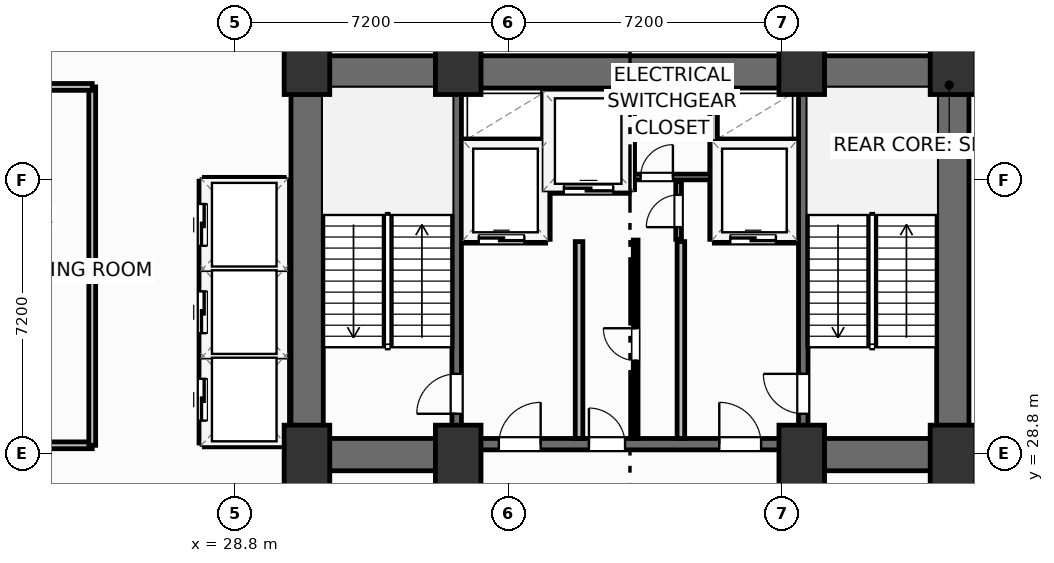
"""IFC4 building model, lengths in metres.
Left out: names, types, materials, properties, quantities, classifications, styles, units other than length and angle.
Written with IfcOpenShell. Run it as: python <this file> out.ifc"""

import sys

from ifc_helpers import new_model, si_unit, direction, frame, frame_2d, origin, origin_2d, place, context, subcontext, project, spatial, rectangle, extrude, element, fill, save


model = new_model("IFC4")
c1 = context("Model", 3, precision=1e-05, world=origin(), true_north=direction((0.0, 1.0)))
c2 = subcontext(c1, "Body", "Model", "MODEL_VIEW")
j1 = project(units=[si_unit("LENGTHUNIT", "METRE"), si_unit("PLANEANGLEUNIT", "RADIAN")], contexts=[c1])
p1 = place(None, origin())
s1 = spatial("IfcSite", under=j1, at=p1, CompositionType="ELEMENT")
p2 = place(p1, origin())
s2 = spatial("IfcBuilding", under=s1, at=p2, CompositionType="ELEMENT")
p3 = place(p2, frame((0.0, 0.0, -4.5)))
s3 = spatial("IfcBuildingStorey", under=s2, at=p3, CompositionType="ELEMENT", Elevation=-4.5)
for number, where, z_axis, x_axis in (
    (1, (30.7, 28.75, 0.0), (0.0, 0.0, 1.0), (1.0, 0.0, 0.0)),
    (2, (34.68, 28.75, 0.0), (0.0, 0.0, 1.0), (1.0, 0.0, 0.0)),
    (3, (43.72, 28.75, 0.0), (0.0, 0.0, 1.0), (1.0, 0.0, 0.0)),
    (4, (47.7, 28.75, 0.0), (0.0, 0.0, 1.0), (1.0, 0.0, 0.0)),
    (5, (30.7, 39.05, 0.0), (0.0, 0.0, 1.0), (1.0, 0.0, 0.0)),
    (6, (34.68, 39.05, 0.0), (0.0, 0.0, 1.0), (1.0, 0.0, 0.0)),
    (7, (43.72, 39.05, 0.0), (0.0, 0.0, 1.0), (1.0, 0.0, 0.0)),
    (8, (47.7, 39.05, 0.0), (0.0, 0.0, 1.0), (1.0, 0.0, 0.0)),
):
    element("IfcColumn", number, at=place(p3, frame(where, z_axis=z_axis, x_axis=x_axis)), inside=s3, PredefinedType="COLUMN", context=c2, shape_type="SweptSolid", body=[
        extrude(rectangle(XDim=1.2, YDim=1.6, at=origin_2d()), origin(), (0.0, 0.0, 1.0), 4.5),
    ])
p4 = place(p3, frame((30.28, 38.845, 0.0), z_axis=(0.0, 0.0, 1.0), x_axis=(1.0, 0.0, 0.0)))
e9 = element("IfcWall", 9, at=p4, inside=s3, PredefinedType="SHEAR", context=c2, shape_type="SweptSolid", body=[
    extrude(rectangle(XDim=17.84, YDim=0.85, at=frame_2d((8.92, 0.0))), origin(), (0.0, 0.0, 1.0), 4.18),
])
for number, where, z_axis, x_axis in (
    (10, (30.705, 29.2, 0.0), (0.0, 0.0, 1.0), (0.0, 1.0, 0.0)),
    (11, (47.695, 29.2, 0.0), (0.0, 0.0, 1.0), (0.0, 1.0, 0.0)),
):
    element("IfcWall", number, at=place(p3, frame(where, z_axis=z_axis, x_axis=x_axis)), inside=s3, PredefinedType="SHEAR", context=c2, shape_type="SweptSolid", body=[
        extrude(rectangle(XDim=9.22, YDim=0.85, at=frame_2d((4.61, 0.0))), origin(), (0.0, 0.0, 1.0), 4.18),
    ])
for number, where, z_axis, x_axis in (
    (12, (30.28, 28.775, 0.0), (0.0, 0.0, 1.0), (1.0, 0.0, 0.0)),
    (13, (43.6, 28.775, 0.0), (0.0, 0.0, 1.0), (1.0, 0.0, 0.0)),
):
    element("IfcWall", number, at=place(p3, frame(where, z_axis=z_axis, x_axis=x_axis)), inside=s3, PredefinedType="SHEAR", context=c2, shape_type="SweptSolid", body=[
        extrude(rectangle(XDim=4.52, YDim=0.85, at=frame_2d((2.26, 0.0))), origin(), (0.0, 0.0, 1.0), 4.18),
    ])
p5 = place(p3, frame((34.8, 29.05, 0.0), z_axis=(0.0, 0.0, 1.0), x_axis=(1.0, 0.0, 0.0)))
e14 = element("IfcWall", 14, at=p5, inside=s3, PredefinedType="SHEAR", context=c2, shape_type="SweptSolid", body=[
    extrude(rectangle(XDim=8.8, YDim=0.3, at=frame_2d((4.4, 0.0))), origin(), (0.0, 0.0, 1.0), 4.18),
])
p6 = place(p5, frame((0.95, 0.0, 0.0)))
e15 = element("IfcOpeningElement", 15, at=p6, cuts=e14, PredefinedType="OPENING", context=c2, shape_type="SweptSolid", body=[
    extrude(rectangle(XDim=1.1, YDim=2.15, at=frame_2d((0.55, 1.075))), frame((0.0, 0.16, 0.0), z_axis=(0.0, -1.0, 0.0), x_axis=(1.0, 0.0, 0.0)), (0.0, 0.0, 1.0), 0.32),
])
p7 = place(p5, frame((6.75, 0.0, 0.0)))
e16 = element("IfcOpeningElement", 16, at=p7, cuts=e14, PredefinedType="OPENING", context=c2, shape_type="SweptSolid", body=[
    extrude(rectangle(XDim=1.1, YDim=2.15, at=frame_2d((0.55, 1.075))), frame((0.0, 0.16, 0.0), z_axis=(0.0, -1.0, 0.0), x_axis=(1.0, 0.0, 0.0)), (0.0, 0.0, 1.0), 0.32),
])
p8 = place(p5, frame((3.32, 0.0, 0.0)))
e17 = element("IfcOpeningElement", 17, at=p8, cuts=e14, PredefinedType="OPENING", context=c2, shape_type="SweptSolid", body=[
    extrude(rectangle(XDim=0.95, YDim=2.15, at=frame_2d((0.475, 1.075))), frame((0.0, 0.16, 0.0), z_axis=(0.0, -1.0, 0.0), x_axis=(1.0, 0.0, 0.0)), (0.0, 0.0, 1.0), 0.32),
])
p9 = place(p3, frame((34.64, 29.2, 0.0), z_axis=(0.0, 0.0, 1.0), x_axis=(0.0, 1.0, 0.0)))
e18 = element("IfcWall", 18, at=p9, inside=s3, PredefinedType="SHEAR", context=c2, shape_type="SweptSolid", body=[
    extrude(rectangle(XDim=9.22, YDim=0.25, at=frame_2d((4.61, 0.0))), origin(), (0.0, 0.0, 1.0), 4.18),
])
p10 = place(p9, frame((0.65, 0.0, 0.0)))
e19 = element("IfcOpeningElement", 19, at=p10, cuts=e18, PredefinedType="OPENING", context=c2, shape_type="SweptSolid", body=[
    extrude(rectangle(XDim=1.05, YDim=2.15, at=frame_2d((0.525, 1.075))), frame((0.0, 0.135, 0.0), z_axis=(0.0, -1.0, 0.0), x_axis=(1.0, 0.0, 0.0)), (0.0, 0.0, 1.0), 0.27),
])
p11 = place(p3, frame((43.76, 29.2, 0.0), z_axis=(0.0, 0.0, 1.0), x_axis=(0.0, 1.0, 0.0)))
e20 = element("IfcWall", 20, at=p11, inside=s3, PredefinedType="SHEAR", context=c2, shape_type="SweptSolid", body=[
    extrude(rectangle(XDim=9.22, YDim=0.25, at=frame_2d((4.61, 0.0))), origin(), (0.0, 0.0, 1.0), 4.18),
])
p12 = place(p11, frame((0.65, 0.0, 0.0)))
e21 = element("IfcOpeningElement", 21, at=p12, cuts=e20, PredefinedType="OPENING", context=c2, shape_type="SweptSolid", body=[
    extrude(rectangle(XDim=1.05, YDim=2.15, at=frame_2d((0.525, 1.075))), frame((0.0, 0.135, 0.0), z_axis=(0.0, -1.0, 0.0), x_axis=(1.0, 0.0, 0.0)), (0.0, 0.0, 1.0), 0.27),
])
p13 = place(p3, frame((18.55, 29.02, 0.0), z_axis=(0.0, 0.0, 1.0), x_axis=(1.0, 0.0, 0.0)))
e22 = element("IfcWall", 22, at=p13, inside=s3, PredefinedType="PARTITIONING", context=c2, shape_type="SweptSolid", body=[
    extrude(rectangle(XDim=6.5, YDim=0.18, at=frame_2d((3.25, 0.0))), origin(), (0.0, 0.0, 1.0), 4.18),
])
p14 = place(p13, frame((2.2, 0.0, 0.0)))
e23 = element("IfcOpeningElement", 23, at=p14, cuts=e22, PredefinedType="OPENING", context=c2, shape_type="SweptSolid", body=[
    extrude(rectangle(XDim=1.6, YDim=2.05, at=frame_2d((0.8, 1.025))), frame((0.0, 0.1, 0.0), z_axis=(0.0, -1.0, 0.0), x_axis=(1.0, 0.0, 0.0)), (0.0, 0.0, 1.0), 0.2),
])
p15 = place(p3, frame((25.05, 29.02, 0.0), z_axis=(0.0, 0.0, 1.0), x_axis=(0.0, 1.0, 0.0)))
e24 = element("IfcWall", 24, at=p15, inside=s3, PredefinedType="PARTITIONING", context=c2, shape_type="SweptSolid", body=[
    extrude(rectangle(XDim=9.43, YDim=0.18, at=frame_2d((4.715, 0.0))), origin(), (0.0, 0.0, 1.0), 4.18),
])
p16 = place(p3, frame((18.55, 38.45, 0.0), z_axis=(0.0, 0.0, 1.0), x_axis=(1.0, 0.0, 0.0)))
e25 = element("IfcWall", 25, at=p16, inside=s3, PredefinedType="PARTITIONING", context=c2, shape_type="SweptSolid", body=[
    extrude(rectangle(XDim=6.5, YDim=0.18, at=frame_2d((3.25, 0.0))), origin(), (0.0, 0.0, 1.0), 4.18),
])
for number, where, z_axis, x_axis in (
    (26, (37.86, 29.2, 0.0), (0.0, 0.0, 1.0), (0.0, 1.0, 0.0)),
    (27, (40.54, 29.2, 0.0), (0.0, 0.0, 1.0), (0.0, 1.0, 0.0)),
):
    element("IfcWall", number, at=place(p3, frame(where, z_axis=z_axis, x_axis=x_axis)), inside=s3, PredefinedType="PARTITIONING", context=c2, shape_type="SweptSolid", body=[
        extrude(rectangle(XDim=5.18, YDim=0.2, at=frame_2d((2.59, 0.0))), origin(), (0.0, 0.0, 1.0), 4.18),
    ])
p17 = place(p3, frame((34.8, 34.44, 0.0), z_axis=(0.0, 0.0, 1.0), x_axis=(1.0, 0.0, 0.0)))
e28 = element("IfcWall", 28, at=p17, inside=s3, PredefinedType="PARTITIONING", context=c2, shape_type="SweptSolid", body=[
    extrude(rectangle(XDim=2.18, YDim=0.2, at=frame_2d((1.09, 0.0))), origin(), (0.0, 0.0, 1.0), 4.18),
])
p18 = place(p17, frame((0.42, 0.0, 0.0)))
e29 = element("IfcOpeningElement", 29, at=p18, cuts=e28, PredefinedType="OPENING", context=c2, shape_type="SweptSolid", body=[
    extrude(rectangle(XDim=1.2, YDim=2.2, at=frame_2d((0.6, 1.1))), frame((0.0, 0.11, 0.0), z_axis=(0.0, -1.0, 0.0), x_axis=(1.0, 0.0, 0.0)), (0.0, 0.0, 1.0), 0.22),
])
p19 = place(p3, frame((34.8, 36.98, 0.0), z_axis=(0.0, 0.0, 1.0), x_axis=(1.0, 0.0, 0.0)))
e30 = element("IfcWall", 30, at=p19, inside=s3, PredefinedType="PARTITIONING", context=c2, shape_type="SweptSolid", body=[
    extrude(rectangle(XDim=2.18, YDim=0.2, at=frame_2d((1.09, 0.0))), origin(), (0.0, 0.0, 1.0), 4.18),
])
p20 = place(p3, frame((37.0, 34.44, 0.0), z_axis=(0.0, 0.0, 1.0), x_axis=(0.0, 1.0, 0.0)))
e31 = element("IfcWall", 31, at=p20, inside=s3, PredefinedType="PARTITIONING", context=c2, shape_type="SweptSolid", body=[
    extrude(rectangle(XDim=3.9, YDim=0.2, at=frame_2d((1.95, 0.0))), origin(), (0.0, 0.0, 1.0), 4.18),
])
p21 = place(p3, frame((41.42, 34.44, 0.0), z_axis=(0.0, 0.0, 1.0), x_axis=(1.0, 0.0, 0.0)))
e32 = element("IfcWall", 32, at=p21, inside=s3, PredefinedType="PARTITIONING", context=c2, shape_type="SweptSolid", body=[
    extrude(rectangle(XDim=2.18, YDim=0.2, at=frame_2d((1.09, 0.0))), origin(), (0.0, 0.0, 1.0), 4.18),
])
p22 = place(p21, frame((0.42, 0.0, 0.0)))
e33 = element("IfcOpeningElement", 33, at=p22, cuts=e32, PredefinedType="OPENING", context=c2, shape_type="SweptSolid", body=[
    extrude(rectangle(XDim=1.2, YDim=2.2, at=frame_2d((0.6, 1.1))), frame((0.0, 0.11, 0.0), z_axis=(0.0, -1.0, 0.0), x_axis=(1.0, 0.0, 0.0)), (0.0, 0.0, 1.0), 0.22),
])
p23 = place(p3, frame((41.42, 36.98, 0.0), z_axis=(0.0, 0.0, 1.0), x_axis=(1.0, 0.0, 0.0)))
e34 = element("IfcWall", 34, at=p23, inside=s3, PredefinedType="PARTITIONING", context=c2, shape_type="SweptSolid", body=[
    extrude(rectangle(XDim=2.18, YDim=0.2, at=frame_2d((1.09, 0.0))), origin(), (0.0, 0.0, 1.0), 4.18),
])
p24 = place(p3, frame((41.4, 34.44, 0.0), z_axis=(0.0, 0.0, 1.0), x_axis=(0.0, 1.0, 0.0)))
e35 = element("IfcWall", 35, at=p24, inside=s3, PredefinedType="PARTITIONING", context=c2, shape_type="SweptSolid", body=[
    extrude(rectangle(XDim=3.9, YDim=0.2, at=frame_2d((1.95, 0.0))), origin(), (0.0, 0.0, 1.0), 4.18),
])
p25 = place(p3, frame((37.06, 35.75, 0.0), z_axis=(0.0, 0.0, 1.0), x_axis=(1.0, 0.0, 0.0)))
e36 = element("IfcWall", 36, at=p25, inside=s3, PredefinedType="PARTITIONING", context=c2, shape_type="SweptSolid", body=[
    extrude(rectangle(XDim=2.12, YDim=0.2, at=frame_2d((1.06, 0.0))), origin(), (0.0, 0.0, 1.0), 4.18),
])
p26 = place(p25, frame((0.4, 0.0, 0.0)))
e37 = element("IfcOpeningElement", 37, at=p26, cuts=e36, PredefinedType="OPENING", context=c2, shape_type="SweptSolid", body=[
    extrude(rectangle(XDim=1.3, YDim=2.2, at=frame_2d((0.65, 1.1))), frame((0.0, 0.11, 0.0), z_axis=(0.0, -1.0, 0.0), x_axis=(1.0, 0.0, 0.0)), (0.0, 0.0, 1.0), 0.22),
])
p27 = place(p3, frame((39.22, 35.75, 0.0), z_axis=(0.0, 0.0, 1.0), x_axis=(0.0, 1.0, 0.0)))
e38 = element("IfcWall", 38, at=p27, inside=s3, PredefinedType="PARTITIONING", context=c2, shape_type="SweptSolid", body=[
    extrude(rectangle(XDim=2.59, YDim=0.2, at=frame_2d((1.295, 0.0))), origin(), (0.0, 0.0, 1.0), 4.18),
])
p28 = place(p3, frame((39.3, 36.08, 0.0), z_axis=(0.0, 0.0, 1.0), x_axis=(1.0, 0.0, 0.0)))
e39 = element("IfcWall", 39, at=p28, inside=s3, PredefinedType="PARTITIONING", context=c2, shape_type="SweptSolid", body=[
    extrude(rectangle(XDim=2.02, YDim=0.15, at=frame_2d((1.01, 0.0))), origin(), (0.0, 0.0, 1.0), 4.18),
])
p29 = place(p28, frame((0.18, 0.0, 0.0)))
e40 = element("IfcOpeningElement", 40, at=p29, cuts=e39, PredefinedType="OPENING", context=c2, shape_type="SweptSolid", body=[
    extrude(rectangle(XDim=0.85, YDim=2.05, at=frame_2d((0.425, 1.025))), frame((0.0, 0.085, 0.0), z_axis=(0.0, -1.0, 0.0), x_axis=(1.0, 0.0, 0.0)), (0.0, 0.0, 1.0), 0.17),
])
p30 = place(p3, frame((40.48, 34.44, 0.0), z_axis=(0.0, 0.0, 1.0), x_axis=(0.0, 1.0, 0.0)))
e41 = element("IfcWall", 41, at=p30, inside=s3, PredefinedType="PARTITIONING", context=c2, shape_type="SweptSolid", body=[
    extrude(rectangle(XDim=1.52, YDim=0.15, at=frame_2d((0.76, 0.0))), origin(), (0.0, 0.0, 1.0), 4.18),
])
p31 = place(p30, frame((0.32, 0.0, 0.0)))
e42 = element("IfcOpeningElement", 42, at=p31, cuts=e41, PredefinedType="OPENING", context=c2, shape_type="SweptSolid", body=[
    extrude(rectangle(XDim=0.85, YDim=2.05, at=frame_2d((0.425, 1.025))), frame((0.0, 0.085, 0.0), z_axis=(0.0, -1.0, 0.0), x_axis=(1.0, 0.0, 0.0)), (0.0, 0.0, 1.0), 0.17),
])
p32 = place(p3, frame((39.35, 29.2, 0.0), z_axis=(0.0, 0.0, 1.0), x_axis=(0.0, 1.0, 0.0)))
e43 = element("IfcWall", 43, at=p32, inside=s3, PredefinedType="PARTITIONING", context=c2, shape_type="SweptSolid", body=[
    extrude(rectangle(XDim=5.22, YDim=0.125, at=frame_2d((2.61, 0.0))), origin(), (0.0, 0.0, 1.0), 4.18),
])
p33 = place(p32, frame((2.05, 0.0, 0.0)))
e44 = element("IfcOpeningElement", 44, at=p33, cuts=e43, PredefinedType="OPENING", context=c2, shape_type="SweptSolid", body=[
    extrude(rectangle(XDim=0.85, YDim=2.05, at=frame_2d((0.425, 1.025))), frame((0.0, 0.073, 0.0), z_axis=(0.0, -1.0, 0.0), x_axis=(1.0, 0.0, 0.0)), (0.0, 0.0, 1.0), 0.145),
])
for number, where, z_axis, x_axis in (
    (45, (28.02, 31.375, 0.0), (0.0, 0.0, 1.0), (1.0, 0.0, 0.0)),
    (46, (28.02, 33.675, 0.0), (0.0, 0.0, 1.0), (1.0, 0.0, 0.0)),
):
    element("IfcWall", number, at=place(p3, frame(where, z_axis=z_axis, x_axis=x_axis)), inside=s3, PredefinedType="PARTITIONING", context=c2, shape_type="SweptSolid", body=[
        extrude(rectangle(XDim=2.06, YDim=0.2, at=frame_2d((1.03, 0.0))), origin(), (0.0, 0.0, 1.0), 4.18),
    ])
for number, where, z_axis, x_axis in (
    (47, (28.0, 29.08, 0.0), (0.0, 0.0, 1.0), (1.0, 0.0, 0.0)),
    (48, (28.0, 35.97, 0.0), (0.0, 0.0, 1.0), (1.0, 0.0, 0.0)),
):
    element("IfcWall", number, at=place(p3, frame(where, z_axis=z_axis, x_axis=x_axis)), inside=s3, PredefinedType="PARTITIONING", context=c2, shape_type="SweptSolid", body=[
        extrude(rectangle(XDim=2.1, YDim=0.2, at=frame_2d((1.05, 0.0))), origin(), (0.0, 0.0, 1.0), 4.18),
    ])
p34 = place(p3, frame((30.12, 29.08, 0.0), z_axis=(0.0, 0.0, 1.0), x_axis=(0.0, 1.0, 0.0)))
e49 = element("IfcWall", 49, at=p34, inside=s3, PredefinedType="PARTITIONING", context=c2, shape_type="SweptSolid", body=[
    extrude(rectangle(XDim=6.89, YDim=0.2, at=frame_2d((3.445, 0.0))), origin(), (0.0, 0.0, 1.0), 4.18),
])
p35 = place(p3, frame((27.96, 29.08, 0.0), z_axis=(0.0, 0.0, 1.0), x_axis=(0.0, 1.0, 0.0)))
e50 = element("IfcWall", 50, at=p35, inside=s3, PredefinedType="PARTITIONING", context=c2, shape_type="SweptSolid", body=[
    extrude(rectangle(XDim=6.89, YDim=0.2, at=frame_2d((3.445, 0.0))), origin(), (0.0, 0.0, 1.0), 4.18),
])
p36 = place(p35, frame((0.59, 0.0, 0.0)))
e51 = element("IfcOpeningElement", 51, at=p36, cuts=e50, PredefinedType="OPENING", context=c2, shape_type="SweptSolid", body=[
    extrude(rectangle(XDim=1.1, YDim=2.15, at=frame_2d((0.55, 1.075))), frame((0.0, 0.11, 0.0), z_axis=(0.0, -1.0, 0.0), x_axis=(1.0, 0.0, 0.0)), (0.0, 0.0, 1.0), 0.22),
])
p37 = place(p35, frame((2.89, 0.0, 0.0)))
e52 = element("IfcOpeningElement", 52, at=p37, cuts=e50, PredefinedType="OPENING", context=c2, shape_type="SweptSolid", body=[
    extrude(rectangle(XDim=1.1, YDim=2.15, at=frame_2d((0.55, 1.075))), frame((0.0, 0.11, 0.0), z_axis=(0.0, -1.0, 0.0), x_axis=(1.0, 0.0, 0.0)), (0.0, 0.0, 1.0), 0.22),
])
p38 = place(p35, frame((5.19, 0.0, 0.0)))
e53 = element("IfcOpeningElement", 53, at=p38, cuts=e50, PredefinedType="OPENING", context=c2, shape_type="SweptSolid", body=[
    extrude(rectangle(XDim=1.1, YDim=2.15, at=frame_2d((0.55, 1.075))), frame((0.0, 0.11, 0.0), z_axis=(0.0, -1.0, 0.0), x_axis=(1.0, 0.0, 0.0)), (0.0, 0.0, 1.0), 0.22),
])
p39 = place(p10, origin())
e54 = element("IfcDoor", 54, at=p39, inside=s3, OperationType="SINGLE_SWING_LEFT", PredefinedType="DOOR", context=c2, shape_type="SweptSolid", body=[
    extrude(rectangle(XDim=1.05, YDim=2.15, at=frame_2d((0.525, 1.075))), frame((0.0, 0.025, 0.0), z_axis=(0.0, -1.0, 0.0), x_axis=(1.0, 0.0, 0.0)), (0.0, 0.0, 1.0), 0.05),
])
fill(e19, e54)
p40 = place(p12, origin())
e55 = element("IfcDoor", 55, at=p40, inside=s3, OperationType="SINGLE_SWING_RIGHT", PredefinedType="DOOR", context=c2, shape_type="SweptSolid", body=[
    extrude(rectangle(XDim=1.05, YDim=2.15, at=frame_2d((0.525, 1.075))), frame((0.0, 0.025, 0.0), z_axis=(0.0, -1.0, 0.0), x_axis=(1.0, 0.0, 0.0)), (0.0, 0.0, 1.0), 0.05),
])
fill(e21, e55)
p41 = place(p6, origin())
e56 = element("IfcDoor", 56, at=p41, inside=s3, OperationType="SINGLE_SWING_RIGHT", PredefinedType="DOOR", context=c2, shape_type="SweptSolid", body=[
    extrude(rectangle(XDim=1.1, YDim=2.15, at=frame_2d((0.55, 1.075))), frame((0.0, 0.025, 0.0), z_axis=(0.0, -1.0, 0.0), x_axis=(1.0, 0.0, 0.0)), (0.0, 0.0, 1.0), 0.05),
])
fill(e15, e56)
p42 = place(p7, origin())
e57 = element("IfcDoor", 57, at=p42, inside=s3, OperationType="SINGLE_SWING_LEFT", PredefinedType="DOOR", context=c2, shape_type="SweptSolid", body=[
    extrude(rectangle(XDim=1.1, YDim=2.15, at=frame_2d((0.55, 1.075))), frame((0.0, 0.025, 0.0), z_axis=(0.0, -1.0, 0.0), x_axis=(1.0, 0.0, 0.0)), (0.0, 0.0, 1.0), 0.05),
])
fill(e16, e57)
p43 = place(p18, origin())
e58 = element("IfcDoor", 58, at=p43, inside=s3, OperationType="SLIDING_TO_LEFT", PredefinedType="DOOR", context=c2, shape_type="SweptSolid", body=[
    extrude(rectangle(XDim=1.2, YDim=2.2, at=frame_2d((0.6, 1.1))), frame((0.0, 0.025, 0.0), z_axis=(0.0, -1.0, 0.0), x_axis=(1.0, 0.0, 0.0)), (0.0, 0.0, 1.0), 0.05),
])
fill(e29, e58)
p44 = place(p22, origin())
e59 = element("IfcDoor", 59, at=p44, inside=s3, OperationType="SLIDING_TO_LEFT", PredefinedType="DOOR", context=c2, shape_type="SweptSolid", body=[
    extrude(rectangle(XDim=1.2, YDim=2.2, at=frame_2d((0.6, 1.1))), frame((0.0, 0.025, 0.0), z_axis=(0.0, -1.0, 0.0), x_axis=(1.0, 0.0, 0.0)), (0.0, 0.0, 1.0), 0.05),
])
fill(e33, e59)
p45 = place(p26, origin())
e60 = element("IfcDoor", 60, at=p45, inside=s3, OperationType="SLIDING_TO_LEFT", PredefinedType="DOOR", context=c2, shape_type="SweptSolid", body=[
    extrude(rectangle(XDim=1.3, YDim=2.2, at=frame_2d((0.65, 1.1))), frame((0.0, 0.025, 0.0), z_axis=(0.0, -1.0, 0.0), x_axis=(1.0, 0.0, 0.0)), (0.0, 0.0, 1.0), 0.05),
])
fill(e37, e60)
p46 = place(p29, origin())
e61 = element("IfcDoor", 61, at=p46, inside=s3, OperationType="SINGLE_SWING_RIGHT", PredefinedType="DOOR", context=c2, shape_type="SweptSolid", body=[
    extrude(rectangle(XDim=0.85, YDim=2.05, at=frame_2d((0.425, 1.025))), frame((0.0, 0.025, 0.0), z_axis=(0.0, -1.0, 0.0), x_axis=(1.0, 0.0, 0.0)), (0.0, 0.0, 1.0), 0.05),
])
fill(e40, e61)
p47 = place(p31, origin())
e62 = element("IfcDoor", 62, at=p47, inside=s3, OperationType="SINGLE_SWING_LEFT", PredefinedType="DOOR", context=c2, shape_type="SweptSolid", body=[
    extrude(rectangle(XDim=0.85, YDim=2.05, at=frame_2d((0.425, 1.025))), frame((0.0, 0.025, 0.0), z_axis=(0.0, -1.0, 0.0), x_axis=(1.0, 0.0, 0.0)), (0.0, 0.0, 1.0), 0.05),
])
fill(e42, e62)
p48 = place(p33, origin())
e63 = element("IfcDoor", 63, at=p48, inside=s3, OperationType="SINGLE_SWING_RIGHT", PredefinedType="DOOR", context=c2, shape_type="SweptSolid", body=[
    extrude(rectangle(XDim=0.85, YDim=2.05, at=frame_2d((0.425, 1.025))), frame((0.0, 0.025, 0.0), z_axis=(0.0, -1.0, 0.0), x_axis=(1.0, 0.0, 0.0)), (0.0, 0.0, 1.0), 0.05),
])
fill(e44, e63)
p49 = place(p8, origin())
e64 = element("IfcDoor", 64, at=p49, inside=s3, OperationType="SINGLE_SWING_LEFT", PredefinedType="DOOR", context=c2, shape_type="SweptSolid", body=[
    extrude(rectangle(XDim=0.95, YDim=2.15, at=frame_2d((0.475, 1.075))), frame((0.0, 0.025, 0.0), z_axis=(0.0, -1.0, 0.0), x_axis=(1.0, 0.0, 0.0)), (0.0, 0.0, 1.0), 0.05),
])
fill(e17, e64)
p50 = place(p36, origin())
e65 = element("IfcDoor", 65, at=p50, inside=s3, OperationType="SLIDING_TO_LEFT", PredefinedType="DOOR", context=c2, shape_type="SweptSolid", body=[
    extrude(rectangle(XDim=1.1, YDim=2.15, at=frame_2d((0.55, 1.075))), frame((0.0, 0.025, 0.0), z_axis=(0.0, -1.0, 0.0), x_axis=(1.0, 0.0, 0.0)), (0.0, 0.0, 1.0), 0.05),
])
fill(e51, e65)
p51 = place(p37, origin())
e66 = element("IfcDoor", 66, at=p51, inside=s3, OperationType="SLIDING_TO_LEFT", PredefinedType="DOOR", context=c2, shape_type="SweptSolid", body=[
    extrude(rectangle(XDim=1.1, YDim=2.15, at=frame_2d((0.55, 1.075))), frame((0.0, 0.025, 0.0), z_axis=(0.0, -1.0, 0.0), x_axis=(1.0, 0.0, 0.0)), (0.0, 0.0, 1.0), 0.05),
])
fill(e52, e66)
p52 = place(p38, origin())
e67 = element("IfcDoor", 67, at=p52, inside=s3, OperationType="SLIDING_TO_LEFT", PredefinedType="DOOR", context=c2, shape_type="SweptSolid", body=[
    extrude(rectangle(XDim=1.1, YDim=2.15, at=frame_2d((0.55, 1.075))), frame((0.0, 0.025, 0.0), z_axis=(0.0, -1.0, 0.0), x_axis=(1.0, 0.0, 0.0)), (0.0, 0.0, 1.0), 0.05),
])
fill(e53, e67)
save(model, sys.argv[1])
